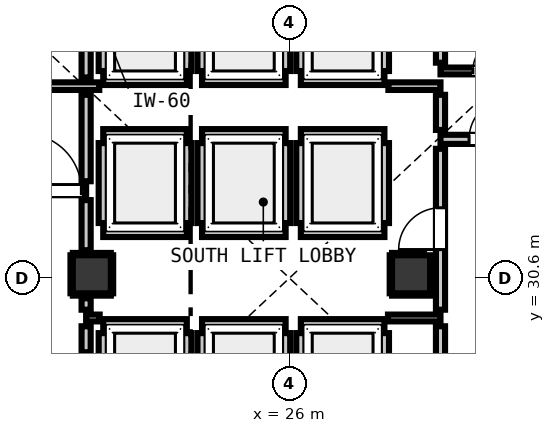
"""IFC4 building model, lengths in metres.
Left out: names, types, materials, properties, quantities, classifications, styles, units other than length and angle.
Written with IfcOpenShell. Run it as: python <this file> out.ifc"""

import sys

from ifc_helpers import new_model, si_unit, direction, frame, frame_2d, origin, origin_2d, place, context, subcontext, project, spatial, rectangle, extrude, element, fill, save


model = new_model("IFC4")
c1 = context("Model", 3, precision=1e-05, world=origin(), true_north=direction((0.0, 1.0)))
c2 = subcontext(c1, "Body", "Model", "MODEL_VIEW")
j1 = project(units=[si_unit("LENGTHUNIT", "METRE"), si_unit("PLANEANGLEUNIT", "RADIAN")], contexts=[c1])
p1 = place(None, origin())
s1 = spatial("IfcSite", under=j1, at=p1, CompositionType="ELEMENT")
p2 = place(p1, origin())
s2 = spatial("IfcBuilding", under=s1, at=p2, CompositionType="ELEMENT")
p3 = place(p2, origin())
s3 = spatial("IfcBuildingStorey", under=s2, at=p3, CompositionType="ELEMENT", Elevation=0.0)
for number, where, z_axis, x_axis in (
    (1, (20.8, 30.7, 0.0), (0.0, 0.0, 1.0), (1.0, 0.0, 0.0)),
    (2, (29.2, 30.7, 0.0), (0.0, 0.0, 1.0), (1.0, 0.0, 0.0)),
):
    element("IfcColumn", number, at=place(p3, frame(where, z_axis=z_axis, x_axis=x_axis)), inside=s3, PredefinedType="COLUMN", context=c2, shape_type="SweptSolid", body=[
        extrude(rectangle(XDim=1.0, YDim=1.0, at=origin_2d()), origin(), (0.0, 0.0, 1.0), 5.2),
    ])
p4 = place(p3, frame((21.1, 35.8, 0.0), z_axis=(0.0, 0.0, 1.0), x_axis=(1.0, 0.0, 0.0)))
e3 = element("IfcWall", 3, at=p4, inside=s3, PredefinedType="PARTITIONING", context=c2, shape_type="SweptSolid", body=[
    extrude(rectangle(XDim=2.2, YDim=0.24, at=frame_2d((1.1, 0.0))), origin(), (0.0, 0.0, 1.0), 4.92),
])
p5 = place(p3, frame((21.1, 36.048, 0.0), z_axis=(0.0, 0.0, 1.0), x_axis=(0.0, 1.0, 0.0)))
e4 = element("IfcWall", 4, at=p5, inside=s3, PredefinedType="PARTITIONING", context=c2, shape_type="SweptSolid", body=[
    extrude(rectangle(XDim=2.104, YDim=0.24, at=frame_2d((1.052, 0.0))), origin(), (0.0, 0.0, 1.0), 3.955),
])
p6 = place(p3, frame((23.3, 36.048, 0.0), z_axis=(0.0, 0.0, 1.0), x_axis=(0.0, 1.0, 0.0)))
e5 = element("IfcWall", 5, at=p6, inside=s3, PredefinedType="PARTITIONING", context=c2, shape_type="SweptSolid", body=[
    extrude(rectangle(XDim=2.104, YDim=0.24, at=frame_2d((1.052, 0.0))), origin(), (0.0, 0.0, 1.0), 4.92),
])
for number, where, z_axis, x_axis in (
    (6, (21.1, 31.8, 0.0), (0.0, 0.0, 1.0), (1.0, 0.0, 0.0)),
    (7, (21.1, 34.4, 0.0), (0.0, 0.0, 1.0), (1.0, 0.0, 0.0)),
):
    element("IfcWall", number, at=place(p3, frame(where, z_axis=z_axis, x_axis=x_axis)), inside=s3, PredefinedType="PARTITIONING", context=c2, shape_type="SweptSolid", body=[
        extrude(rectangle(XDim=2.2, YDim=0.24, at=frame_2d((1.1, 0.0))), origin(), (0.0, 0.0, 1.0), 4.92),
    ])
p7 = place(p3, frame((21.1, 32.048, 0.0), z_axis=(0.0, 0.0, 1.0), x_axis=(0.0, 1.0, 0.0)))
e8 = element("IfcWall", 8, at=p7, inside=s3, PredefinedType="PARTITIONING", context=c2, shape_type="SweptSolid", body=[
    extrude(rectangle(XDim=2.104, YDim=0.24, at=frame_2d((1.052, 0.0))), origin(), (0.0, 0.0, 1.0), 3.955),
])
p8 = place(p3, frame((23.3, 32.048, 0.0), z_axis=(0.0, 0.0, 1.0), x_axis=(0.0, 1.0, 0.0)))
e9 = element("IfcWall", 9, at=p8, inside=s3, PredefinedType="PARTITIONING", context=c2, shape_type="SweptSolid", body=[
    extrude(rectangle(XDim=2.104, YDim=0.24, at=frame_2d((1.052, 0.0))), origin(), (0.0, 0.0, 1.0), 4.92),
])
p9 = place(p3, frame((21.1, 29.4, 0.0), z_axis=(0.0, 0.0, 1.0), x_axis=(1.0, 0.0, 0.0)))
e10 = element("IfcWall", 10, at=p9, inside=s3, PredefinedType="PARTITIONING", context=c2, shape_type="SweptSolid", body=[
    extrude(rectangle(XDim=2.2, YDim=0.24, at=frame_2d((1.1, 0.0))), origin(), (0.0, 0.0, 1.0), 4.92),
])
p10 = place(p3, frame((21.1, 27.048, 0.0), z_axis=(0.0, 0.0, 1.0), x_axis=(0.0, 1.0, 0.0)))
e11 = element("IfcWall", 11, at=p10, inside=s3, PredefinedType="PARTITIONING", context=c2, shape_type="SweptSolid", body=[
    extrude(rectangle(XDim=2.104, YDim=0.24, at=frame_2d((1.052, 0.0))), origin(), (0.0, 0.0, 1.0), 3.955),
])
p11 = place(p3, frame((23.3, 27.048, 0.0), z_axis=(0.0, 0.0, 1.0), x_axis=(0.0, 1.0, 0.0)))
e12 = element("IfcWall", 12, at=p11, inside=s3, PredefinedType="PARTITIONING", context=c2, shape_type="SweptSolid", body=[
    extrude(rectangle(XDim=2.104, YDim=0.24, at=frame_2d((1.052, 0.0))), origin(), (0.0, 0.0, 1.0), 4.92),
])
p12 = place(p3, frame((23.7, 35.8, 0.0), z_axis=(0.0, 0.0, 1.0), x_axis=(1.0, 0.0, 0.0)))
e13 = element("IfcWall", 13, at=p12, inside=s3, PredefinedType="PARTITIONING", context=c2, shape_type="SweptSolid", body=[
    extrude(rectangle(XDim=2.2, YDim=0.24, at=frame_2d((1.1, 0.0))), origin(), (0.0, 0.0, 1.0), 4.92),
])
for number, where, z_axis, x_axis in (
    (14, (23.7, 36.048, 0.0), (0.0, 0.0, 1.0), (0.0, 1.0, 0.0)),
    (15, (25.9, 36.048, 0.0), (0.0, 0.0, 1.0), (0.0, 1.0, 0.0)),
):
    element("IfcWall", number, at=place(p3, frame(where, z_axis=z_axis, x_axis=x_axis)), inside=s3, PredefinedType="PARTITIONING", context=c2, shape_type="SweptSolid", body=[
        extrude(rectangle(XDim=2.104, YDim=0.24, at=frame_2d((1.052, 0.0))), origin(), (0.0, 0.0, 1.0), 4.92),
    ])
for number, where, z_axis, x_axis in (
    (16, (23.7, 31.8, 0.0), (0.0, 0.0, 1.0), (1.0, 0.0, 0.0)),
    (17, (23.7, 34.4, 0.0), (0.0, 0.0, 1.0), (1.0, 0.0, 0.0)),
):
    element("IfcWall", number, at=place(p3, frame(where, z_axis=z_axis, x_axis=x_axis)), inside=s3, PredefinedType="PARTITIONING", context=c2, shape_type="SweptSolid", body=[
        extrude(rectangle(XDim=2.2, YDim=0.24, at=frame_2d((1.1, 0.0))), origin(), (0.0, 0.0, 1.0), 4.92),
    ])
for number, where, z_axis, x_axis in (
    (18, (23.7, 32.048, 0.0), (0.0, 0.0, 1.0), (0.0, 1.0, 0.0)),
    (19, (25.9, 32.048, 0.0), (0.0, 0.0, 1.0), (0.0, 1.0, 0.0)),
):
    element("IfcWall", number, at=place(p3, frame(where, z_axis=z_axis, x_axis=x_axis)), inside=s3, PredefinedType="PARTITIONING", context=c2, shape_type="SweptSolid", body=[
        extrude(rectangle(XDim=2.104, YDim=0.24, at=frame_2d((1.052, 0.0))), origin(), (0.0, 0.0, 1.0), 4.92),
    ])
p13 = place(p3, frame((23.7, 29.4, 0.0), z_axis=(0.0, 0.0, 1.0), x_axis=(1.0, 0.0, 0.0)))
e20 = element("IfcWall", 20, at=p13, inside=s3, PredefinedType="PARTITIONING", context=c2, shape_type="SweptSolid", body=[
    extrude(rectangle(XDim=2.2, YDim=0.24, at=frame_2d((1.1, 0.0))), origin(), (0.0, 0.0, 1.0), 4.92),
])
for number, where, z_axis, x_axis in (
    (21, (23.7, 27.048, 0.0), (0.0, 0.0, 1.0), (0.0, 1.0, 0.0)),
    (22, (25.9, 27.048, 0.0), (0.0, 0.0, 1.0), (0.0, 1.0, 0.0)),
):
    element("IfcWall", number, at=place(p3, frame(where, z_axis=z_axis, x_axis=x_axis)), inside=s3, PredefinedType="PARTITIONING", context=c2, shape_type="SweptSolid", body=[
        extrude(rectangle(XDim=2.104, YDim=0.24, at=frame_2d((1.052, 0.0))), origin(), (0.0, 0.0, 1.0), 4.92),
    ])
p14 = place(p3, frame((26.3, 35.8, 0.0), z_axis=(0.0, 0.0, 1.0), x_axis=(1.0, 0.0, 0.0)))
e23 = element("IfcWall", 23, at=p14, inside=s3, PredefinedType="PARTITIONING", context=c2, shape_type="SweptSolid", body=[
    extrude(rectangle(XDim=2.2, YDim=0.24, at=frame_2d((1.1, 0.0))), origin(), (0.0, 0.0, 1.0), 4.92),
])
for number, where, z_axis, x_axis in (
    (24, (26.3, 36.048, 0.0), (0.0, 0.0, 1.0), (0.0, 1.0, 0.0)),
    (25, (28.5, 36.048, 0.0), (0.0, 0.0, 1.0), (0.0, 1.0, 0.0)),
):
    element("IfcWall", number, at=place(p3, frame(where, z_axis=z_axis, x_axis=x_axis)), inside=s3, PredefinedType="PARTITIONING", context=c2, shape_type="SweptSolid", body=[
        extrude(rectangle(XDim=2.104, YDim=0.24, at=frame_2d((1.052, 0.0))), origin(), (0.0, 0.0, 1.0), 4.92),
    ])
for number, where, z_axis, x_axis in (
    (26, (26.3, 31.8, 0.0), (0.0, 0.0, 1.0), (1.0, 0.0, 0.0)),
    (27, (26.3, 34.4, 0.0), (0.0, 0.0, 1.0), (1.0, 0.0, 0.0)),
):
    element("IfcWall", number, at=place(p3, frame(where, z_axis=z_axis, x_axis=x_axis)), inside=s3, PredefinedType="PARTITIONING", context=c2, shape_type="SweptSolid", body=[
        extrude(rectangle(XDim=2.2, YDim=0.24, at=frame_2d((1.1, 0.0))), origin(), (0.0, 0.0, 1.0), 4.92),
    ])
for number, where, z_axis, x_axis in (
    (28, (26.3, 32.048, 0.0), (0.0, 0.0, 1.0), (0.0, 1.0, 0.0)),
    (29, (28.5, 32.048, 0.0), (0.0, 0.0, 1.0), (0.0, 1.0, 0.0)),
):
    element("IfcWall", number, at=place(p3, frame(where, z_axis=z_axis, x_axis=x_axis)), inside=s3, PredefinedType="PARTITIONING", context=c2, shape_type="SweptSolid", body=[
        extrude(rectangle(XDim=2.104, YDim=0.24, at=frame_2d((1.052, 0.0))), origin(), (0.0, 0.0, 1.0), 4.92),
    ])
p15 = place(p3, frame((26.3, 29.4, 0.0), z_axis=(0.0, 0.0, 1.0), x_axis=(1.0, 0.0, 0.0)))
e30 = element("IfcWall", 30, at=p15, inside=s3, PredefinedType="PARTITIONING", context=c2, shape_type="SweptSolid", body=[
    extrude(rectangle(XDim=2.2, YDim=0.24, at=frame_2d((1.1, 0.0))), origin(), (0.0, 0.0, 1.0), 4.92),
])
p16 = place(p3, frame((26.3, 27.048, 0.0), z_axis=(0.0, 0.0, 1.0), x_axis=(0.0, 1.0, 0.0)))
e31 = element("IfcWall", 31, at=p16, inside=s3, PredefinedType="PARTITIONING", context=c2, shape_type="SweptSolid", body=[
    extrude(rectangle(XDim=2.104, YDim=0.24, at=frame_2d((1.052, 0.0))), origin(), (0.0, 0.0, 1.0), 4.92),
])
p17 = place(p3, frame((28.5, 27.33, 0.0), z_axis=(0.0, 0.0, 1.0), x_axis=(0.0, 1.0, 0.0)))
e32 = element("IfcWall", 32, at=p17, inside=s3, PredefinedType="PARTITIONING", context=c2, shape_type="SweptSolid", body=[
    extrude(rectangle(XDim=1.822, YDim=0.24, at=frame_2d((0.911, 0.0))), origin(), (0.0, 0.0, 1.0), 4.92),
])
p18 = place(p3, frame((17.45, 32.9, 0.0), z_axis=(0.0, 0.0, 1.0), x_axis=(1.0, 0.0, 0.0)))
e33 = element("IfcWall", 33, at=p18, inside=s3, PredefinedType="PARTITIONING", context=c2, shape_type="SweptSolid", body=[
    extrude(rectangle(XDim=3.2, YDim=0.24, at=frame_2d((1.6, 0.0))), origin(), (0.0, 0.0, 1.0), 4.92),
])
p19 = place(p18, frame((0.159, 0.0, 0.0)))
e34 = element("IfcOpeningElement", 34, at=p19, cuts=e33, PredefinedType="OPENING", context=c2, shape_type="SweptSolid", body=[
    extrude(rectangle(XDim=1.1, YDim=2.15, at=frame_2d((0.55, 1.075))), frame((0.0, 0.13, 0.0), z_axis=(0.0, -1.0, 0.0), x_axis=(1.0, 0.0, 0.0)), (0.0, 0.0, 1.0), 0.26),
])
p20 = place(p18, frame((1.576, 0.0, 0.0)))
e35 = element("IfcOpeningElement", 35, at=p20, cuts=e33, PredefinedType="OPENING", context=c2, shape_type="SweptSolid", body=[
    extrude(rectangle(XDim=1.5, YDim=2.15, at=frame_2d((0.75, 1.075))), frame((0.0, 0.13, 0.0), z_axis=(0.0, -1.0, 0.0), x_axis=(1.0, 0.0, 0.0)), (0.0, 0.0, 1.0), 0.26),
])
p21 = place(p3, frame((29.975, 34.25, 0.0), z_axis=(0.0, 0.0, 1.0), x_axis=(1.0, 0.0, 0.0)))
e36 = element("IfcWall", 36, at=p21, inside=s3, PredefinedType="PARTITIONING", context=c2, shape_type="SweptSolid", body=[
    extrude(rectangle(XDim=2.475, YDim=0.24, at=frame_2d((1.237, 0.0))), origin(), (0.0, 0.0, 1.0), 4.92),
])
p22 = place(p21, frame((0.752, 0.0, 0.0)))
e37 = element("IfcOpeningElement", 37, at=p22, cuts=e36, PredefinedType="OPENING", context=c2, shape_type="SweptSolid", body=[
    extrude(rectangle(XDim=1.1, YDim=2.15, at=frame_2d((0.55, 1.075))), frame((0.0, 0.13, 0.0), z_axis=(0.0, -1.0, 0.0), x_axis=(1.0, 0.0, 0.0)), (0.0, 0.0, 1.0), 0.26),
])
p23 = place(p3, frame((18.95, 35.65, 0.0), z_axis=(0.0, 0.0, 1.0), x_axis=(1.0, 0.0, 0.0)))
e38 = element("IfcWall", 38, at=p23, inside=s3, PredefinedType="PARTITIONING", context=c2, shape_type="SweptSolid", body=[
    extrude(rectangle(XDim=2.046, YDim=0.2, at=frame_2d((1.023, 0.0))), origin(), (0.0, 0.0, 1.0), 4.92),
])
p24 = place(p3, frame((28.604, 35.65, 0.0), z_axis=(0.0, 0.0, 1.0), x_axis=(1.0, 0.0, 0.0)))
e39 = element("IfcWall", 39, at=p24, inside=s3, PredefinedType="PARTITIONING", context=c2, shape_type="SweptSolid", body=[
    extrude(rectangle(XDim=1.371, YDim=0.2, at=frame_2d((0.686, 0.0))), origin(), (0.0, 0.0, 1.0), 4.92),
])
p25 = place(p3, frame((20.65, 29.55, 0.0), z_axis=(0.0, 0.0, 1.0), x_axis=(1.0, 0.0, 0.0)))
e40 = element("IfcWall", 40, at=p25, inside=s3, PredefinedType="PARTITIONING", context=c2, shape_type="SweptSolid", body=[
    extrude(rectangle(XDim=0.357, YDim=0.18, at=frame_2d((0.179, 0.0))), origin(), (0.0, 0.0, 1.0), 4.92),
])
p26 = place(p3, frame((28.593, 29.55, 0.0), z_axis=(0.0, 0.0, 1.0), x_axis=(1.0, 0.0, 0.0)))
e41 = element("IfcWall", 41, at=p26, inside=s3, PredefinedType="PARTITIONING", context=c2, shape_type="SweptSolid", body=[
    extrude(rectangle(XDim=1.382, YDim=0.18, at=frame_2d((0.691, 0.0))), origin(), (0.0, 0.0, 1.0), 4.92),
])
p27 = place(p3, frame((29.975, 36.05, 0.0), z_axis=(0.0, 0.0, 1.0), x_axis=(1.0, 0.0, 0.0)))
e42 = element("IfcWall", 42, at=p27, inside=s3, PredefinedType="PARTITIONING", context=c2, shape_type="SweptSolid", body=[
    extrude(rectangle(XDim=2.505, YDim=0.18, at=frame_2d((1.252, 0.0))), origin(), (0.0, 0.0, 1.0), 4.92),
])
p28 = place(p27, frame((0.852, 0.0, 0.0)))
e43 = element("IfcOpeningElement", 43, at=p28, cuts=e42, PredefinedType="OPENING", context=c2, shape_type="SweptSolid", body=[
    extrude(rectangle(XDim=0.9, YDim=2.1, at=frame_2d((0.45, 1.05))), frame((0.0, 0.1, 0.0), z_axis=(0.0, -1.0, 0.0), x_axis=(1.0, 0.0, 0.0)), (0.0, 0.0, 1.0), 0.2),
])
p29 = place(p3, frame((20.65, 28.648, 0.0), z_axis=(0.0, 0.0, 1.0), x_axis=(0.0, 1.0, 0.0)))
e44 = element("IfcWall", 44, at=p29, inside=s3, PredefinedType="PARTITIONING", context=c2, shape_type="SweptSolid", body=[
    extrude(rectangle(XDim=0.684, YDim=0.24, at=frame_2d((0.342, 0.0))), origin(), (0.0, 0.0, 1.0), 3.955),
])
p30 = place(p3, frame((20.65, 29.768, 0.0), z_axis=(0.0, 0.0, 1.0), x_axis=(0.0, 1.0, 0.0)))
e45 = element("IfcWall", 45, at=p30, inside=s3, PredefinedType="PARTITIONING", context=c2, shape_type="SweptSolid", body=[
    extrude(rectangle(XDim=0.3, YDim=0.24, at=frame_2d((0.15, 0.0))), origin(), (0.0, 0.0, 1.0), 3.955),
])
p31 = place(p3, frame((20.65, 31.332, 0.0), z_axis=(0.0, 0.0, 1.0), x_axis=(0.0, 1.0, 0.0)))
e46 = element("IfcWall", 46, at=p31, inside=s3, PredefinedType="PARTITIONING", context=c2, shape_type="SweptSolid", body=[
    extrude(rectangle(XDim=1.32, YDim=0.24, at=frame_2d((0.66, 0.0))), origin(), (0.0, 0.0, 1.0), 3.955),
])
p32 = place(p3, frame((20.65, 33.148, 0.0), z_axis=(0.0, 0.0, 1.0), x_axis=(0.0, 1.0, 0.0)))
e47 = element("IfcWall", 47, at=p32, inside=s3, PredefinedType="PARTITIONING", context=c2, shape_type="SweptSolid", body=[
    extrude(rectangle(XDim=2.274, YDim=0.24, at=frame_2d((1.137, 0.0))), origin(), (0.0, 0.0, 1.0), 3.955),
])
p33 = place(p3, frame((20.65, 35.878, 0.0), z_axis=(0.0, 0.0, 1.0), x_axis=(0.0, 1.0, 0.0)))
e48 = element("IfcWall", 48, at=p33, inside=s3, PredefinedType="PARTITIONING", context=c2, shape_type="SweptSolid", body=[
    extrude(rectangle(XDim=2.674, YDim=0.24, at=frame_2d((1.337, 0.0))), origin(), (0.0, 0.0, 1.0), 3.955),
])
p34 = place(p3, frame((29.975, 25.648, 0.0), z_axis=(0.0, 0.0, 1.0), x_axis=(0.0, 1.0, 0.0)))
e49 = element("IfcWall", 49, at=p34, inside=s3, PredefinedType="PARTITIONING", context=c2, shape_type="SweptSolid", body=[
    extrude(rectangle(XDim=3.684, YDim=0.24, at=frame_2d((1.842, 0.0))), origin(), (0.0, 0.0, 1.0), 4.92),
])
p35 = place(p3, frame((29.975, 29.768, 0.0), z_axis=(0.0, 0.0, 1.0), x_axis=(0.0, 1.0, 0.0)))
e50 = element("IfcWall", 50, at=p35, inside=s3, PredefinedType="PARTITIONING", context=c2, shape_type="SweptSolid", body=[
    extrude(rectangle(XDim=4.234, YDim=0.24, at=frame_2d((2.117, 0.0))), origin(), (0.0, 0.0, 1.0), 4.92),
])
p36 = place(p35, frame((1.582, 0.0, 0.0)))
e51 = element("IfcOpeningElement", 51, at=p36, cuts=e50, PredefinedType="OPENING", context=c2, shape_type="SweptSolid", body=[
    extrude(rectangle(XDim=1.1, YDim=2.15, at=frame_2d((0.55, 1.075))), frame((0.0, 0.13, 0.0), z_axis=(0.0, -1.0, 0.0), x_axis=(1.0, 0.0, 0.0)), (0.0, 0.0, 1.0), 0.26),
])
p37 = place(p3, frame((29.975, 34.498, 0.0), z_axis=(0.0, 0.0, 1.0), x_axis=(0.0, 1.0, 0.0)))
e52 = element("IfcWall", 52, at=p37, inside=s3, PredefinedType="PARTITIONING", context=c2, shape_type="SweptSolid", body=[
    extrude(rectangle(XDim=0.924, YDim=0.24, at=frame_2d((0.462, 0.0))), origin(), (0.0, 0.0, 1.0), 4.92),
])
p38 = place(p3, frame((29.975, 36.268, 0.0), z_axis=(0.0, 0.0, 1.0), x_axis=(0.0, 1.0, 0.0)))
e53 = element("IfcWall", 53, at=p38, inside=s3, PredefinedType="PARTITIONING", context=c2, shape_type="SweptSolid", body=[
    extrude(rectangle(XDim=2.284, YDim=0.24, at=frame_2d((1.142, 0.0))), origin(), (0.0, 0.0, 1.0), 4.92),
])
for number, where, z_axis, x_axis in (
    (54, (20.3, 30.168, 0.0), (0.0, 0.0, 1.0), (1.0, 0.0, 0.0)),
    (55, (20.3, 31.232, 0.0), (0.0, 0.0, 1.0), (1.0, 0.0, 0.0)),
    (56, (20.268, 30.2, 0.0), (0.0, 0.0, 1.0), (0.0, 1.0, 0.0)),
    (57, (21.332, 30.2, 0.0), (0.0, 0.0, 1.0), (0.0, 1.0, 0.0)),
    (58, (28.7, 30.168, 0.0), (0.0, 0.0, 1.0), (1.0, 0.0, 0.0)),
):
    element("IfcWall", number, at=place(p3, frame(where, z_axis=z_axis, x_axis=x_axis)), inside=s3, PredefinedType="PARTITIONING", context=c2, shape_type="SweptSolid", body=[
        extrude(rectangle(XDim=1.0, YDim=0.06, at=frame_2d((0.5, 0.0))), origin(), (0.0, 0.0, 1.0), 1.45),
    ])
p39 = place(p3, frame((28.7, 31.232, 0.0), z_axis=(0.0, 0.0, 1.0), x_axis=(1.0, 0.0, 0.0)))
e59 = element("IfcWall", 59, at=p39, inside=s3, PredefinedType="PARTITIONING", context=c2, shape_type="SweptSolid", body=[
    extrude(rectangle(XDim=0.841, YDim=0.06, at=frame_2d((0.42, 0.0))), origin(), (0.0, 0.0, 1.0), 1.45),
])
p40 = place(p3, frame((28.668, 30.2, 0.0), z_axis=(0.0, 0.0, 1.0), x_axis=(0.0, 1.0, 0.0)))
e60 = element("IfcWall", 60, at=p40, inside=s3, PredefinedType="PARTITIONING", context=c2, shape_type="SweptSolid", body=[
    extrude(rectangle(XDim=1.0, YDim=0.06, at=frame_2d((0.5, 0.0))), origin(), (0.0, 0.0, 1.0), 1.45),
])
p41 = place(p3, frame((29.732, 30.2, 0.0), z_axis=(0.0, 0.0, 1.0), x_axis=(0.0, 1.0, 0.0)))
e61 = element("IfcWall", 61, at=p41, inside=s3, PredefinedType="PARTITIONING", context=c2, shape_type="SweptSolid", body=[
    extrude(rectangle(XDim=0.772, YDim=0.06, at=frame_2d((0.386, 0.0))), origin(), (0.0, 0.0, 1.0), 1.45),
])
p42 = place(p36, origin())
e62 = element("IfcDoor", 62, at=p42, inside=s3, OperationType="SINGLE_SWING_LEFT", PredefinedType="DOOR", context=c2, shape_type="SweptSolid", body=[
    extrude(rectangle(XDim=1.1, YDim=2.15, at=frame_2d((0.55, 1.075))), frame((0.0, 0.025, 0.0), z_axis=(0.0, -1.0, 0.0), x_axis=(1.0, 0.0, 0.0)), (0.0, 0.0, 1.0), 0.05),
])
fill(e51, e62)
p43 = place(p22, origin())
e63 = element("IfcDoor", 63, at=p43, inside=s3, OperationType="SINGLE_SWING_RIGHT", PredefinedType="DOOR", context=c2, shape_type="SweptSolid", body=[
    extrude(rectangle(XDim=1.1, YDim=2.15, at=frame_2d((0.55, 1.075))), frame((0.0, 0.025, 0.0), z_axis=(0.0, -1.0, 0.0), x_axis=(1.0, 0.0, 0.0)), (0.0, 0.0, 1.0), 0.05),
])
fill(e37, e63)
p44 = place(p20, origin())
e64 = element("IfcDoor", 64, at=p44, inside=s3, OperationType="SINGLE_SWING_LEFT", PredefinedType="DOOR", context=c2, shape_type="SweptSolid", body=[
    extrude(rectangle(XDim=1.5, YDim=2.15, at=frame_2d((0.75, 1.075))), frame((0.0, 0.025, 0.0), z_axis=(0.0, -1.0, 0.0), x_axis=(1.0, 0.0, 0.0)), (0.0, 0.0, 1.0), 0.05),
])
fill(e35, e64)
p45 = place(p28, origin())
e65 = element("IfcDoor", 65, at=p45, inside=s3, OperationType="SINGLE_SWING_RIGHT", PredefinedType="DOOR", context=c2, shape_type="SweptSolid", body=[
    extrude(rectangle(XDim=0.9, YDim=2.1, at=frame_2d((0.45, 1.05))), frame((0.0, 0.025, 0.0), z_axis=(0.0, -1.0, 0.0), x_axis=(1.0, 0.0, 0.0)), (0.0, 0.0, 1.0), 0.05),
])
fill(e43, e65)
save(model, sys.argv[1])
